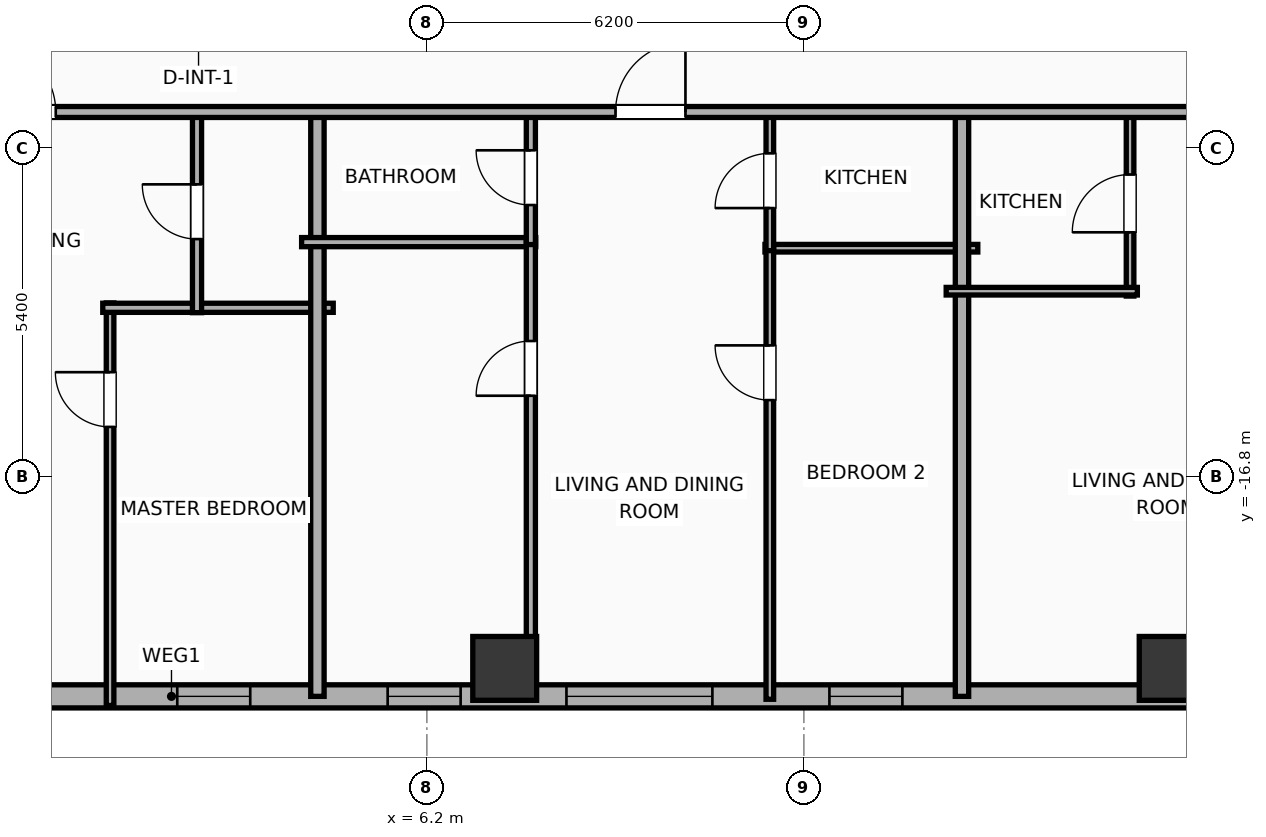
"""IFC4 building model, lengths in metres.
Left out: names, types, materials, properties, quantities, classifications, styles, units other than length and angle.
Written with IfcOpenShell. Run it as: python <this file> out.ifc"""

import sys

from ifc_helpers import new_model, si_unit, direction, frame, frame_2d, origin, origin_2d, place, context, subcontext, project, spatial, rectangle, hollow_rectangle, extrude, element, fill, save


model = new_model("IFC4")
c1 = context("Model", 3, precision=1e-05, world=origin(), true_north=direction((0.0, 1.0)))
c2 = subcontext(c1, "Body", "Model", "MODEL_VIEW")
j1 = project(units=[si_unit("LENGTHUNIT", "METRE"), si_unit("PLANEANGLEUNIT", "RADIAN")], contexts=[c1])
p1 = place(None, origin())
s1 = spatial("IfcSite", under=j1, at=p1, CompositionType="ELEMENT")
p2 = place(p1, origin())
s2 = spatial("IfcBuilding", under=s1, at=p2, CompositionType="ELEMENT")
p3 = place(p2, frame((0.0, 0.0, 109.2)))
s3 = spatial("IfcBuildingStorey", under=s2, at=p3, CompositionType="ELEMENT", Elevation=109.2)
for number, where, z_axis, x_axis in (
    (1, (7.48, -19.95, 0.0), (0.0, 0.0, 1.0), (1.0, 0.0, 0.0)),
    (2, (18.44, -19.95, 0.0), (0.0, 0.0, 1.0), (1.0, 0.0, 0.0)),
):
    element("IfcColumn", number, at=place(p3, frame(where, z_axis=z_axis, x_axis=x_axis)), inside=s3, PredefinedType="COLUMN", context=c2, shape_type="SweptSolid", body=[
        extrude(hollow_rectangle(XDim=1.05, YDim=1.05, WallThickness=0.036, at=origin_2d()), origin(), (0.0, 0.0, 1.0), 3.9),
    ])
p4 = place(p3, frame((29.381, -20.41, 0.0), z_axis=(0.0, 0.0, 1.0), x_axis=(-1.0, 0.0, 0.0)))
e3 = element("IfcWall", 3, at=p4, inside=s3, PredefinedType="ELEMENTEDWALL", context=c2, shape_type="SweptSolid", body=[
    extrude(rectangle(XDim=54.763, YDim=0.38, at=frame_2d((27.381, 0.0))), origin(), (0.0, 0.0, 1.0), 3.65),
])
p5 = place(p4, frame((3.995, 0.0, 0.75)))
e4 = element("IfcOpeningElement", 4, at=p5, cuts=e3, PredefinedType="OPENING", context=c2, shape_type="SweptSolid", body=[
    extrude(rectangle(XDim=2.4, YDim=2.1, at=frame_2d((1.2, 1.05))), frame((0.0, 0.2, 0.0), z_axis=(0.0, -1.0, 0.0), x_axis=(1.0, 0.0, 0.0)), (0.0, 0.0, 1.0), 0.4),
])
p6 = place(p4, frame((18.486, 0.0, 0.75)))
e5 = element("IfcOpeningElement", 5, at=p6, cuts=e3, PredefinedType="OPENING", context=c2, shape_type="SweptSolid", body=[
    extrude(rectangle(XDim=2.4, YDim=2.1, at=frame_2d((1.2, 1.05))), frame((0.0, 0.2, 0.0), z_axis=(0.0, -1.0, 0.0), x_axis=(1.0, 0.0, 0.0)), (0.0, 0.0, 1.0), 0.4),
])
p7 = place(p4, frame((46.717, 0.0, 0.75)))
e6 = element("IfcOpeningElement", 6, at=p7, cuts=e3, PredefinedType="OPENING", context=c2, shape_type="SweptSolid", body=[
    extrude(rectangle(XDim=2.4, YDim=2.1, at=frame_2d((1.2, 1.05))), frame((0.0, 0.2, 0.0), z_axis=(0.0, -1.0, 0.0), x_axis=(1.0, 0.0, 0.0)), (0.0, 0.0, 1.0), 0.4),
])
p8 = place(p4, frame((52.651, 0.0, 0.75)))
e7 = element("IfcOpeningElement", 7, at=p8, cuts=e3, PredefinedType="OPENING", context=c2, shape_type="SweptSolid", body=[
    extrude(rectangle(XDim=1.2, YDim=2.05, at=frame_2d((0.6, 1.025))), frame((0.0, 0.2, 0.0), z_axis=(0.0, -1.0, 0.0), x_axis=(1.0, 0.0, 0.0)), (0.0, 0.0, 1.0), 0.4),
])
p9 = place(p4, frame((50.521, 0.0, 0.75)))
e8 = element("IfcOpeningElement", 8, at=p9, cuts=e3, PredefinedType="OPENING", context=c2, shape_type="SweptSolid", body=[
    extrude(rectangle(XDim=1.2, YDim=2.05, at=frame_2d((0.6, 1.025))), frame((0.0, 0.2, 0.0), z_axis=(0.0, -1.0, 0.0), x_axis=(1.0, 0.0, 0.0)), (0.0, 0.0, 1.0), 0.4),
])
p10 = place(p4, frame((40.191, 0.0, 0.75)))
e9 = element("IfcOpeningElement", 9, at=p10, cuts=e3, PredefinedType="OPENING", context=c2, shape_type="SweptSolid", body=[
    extrude(rectangle(XDim=1.2, YDim=2.05, at=frame_2d((0.6, 1.025))), frame((0.0, 0.2, 0.0), z_axis=(0.0, -1.0, 0.0), x_axis=(1.0, 0.0, 0.0)), (0.0, 0.0, 1.0), 0.4),
])
p11 = place(p4, frame((44.631, 0.0, 0.75)))
e10 = element("IfcOpeningElement", 10, at=p11, cuts=e3, PredefinedType="OPENING", context=c2, shape_type="SweptSolid", body=[
    extrude(rectangle(XDim=1.2, YDim=2.05, at=frame_2d((0.6, 1.025))), frame((0.0, 0.2, 0.0), z_axis=(0.0, -1.0, 0.0), x_axis=(1.0, 0.0, 0.0)), (0.0, 0.0, 1.0), 0.4),
])
p12 = place(p4, frame((36.561, 0.0, 0.75)))
e11 = element("IfcOpeningElement", 11, at=p12, cuts=e3, PredefinedType="OPENING", context=c2, shape_type="SweptSolid", body=[
    extrude(rectangle(XDim=1.2, YDim=2.05, at=frame_2d((0.6, 1.025))), frame((0.0, 0.2, 0.0), z_axis=(0.0, -1.0, 0.0), x_axis=(1.0, 0.0, 0.0)), (0.0, 0.0, 1.0), 0.4),
])
p13 = place(p4, frame((30.004, 0.0, 0.75)))
e12 = element("IfcOpeningElement", 12, at=p13, cuts=e3, PredefinedType="OPENING", context=c2, shape_type="SweptSolid", body=[
    extrude(rectangle(XDim=1.2, YDim=2.05, at=frame_2d((0.6, 1.025))), frame((0.0, 0.2, 0.0), z_axis=(0.0, -1.0, 0.0), x_axis=(1.0, 0.0, 0.0)), (0.0, 0.0, 1.0), 0.4),
])
p14 = place(p4, frame((33.599, 0.0, 0.75)))
e13 = element("IfcOpeningElement", 13, at=p14, cuts=e3, PredefinedType="OPENING", context=c2, shape_type="SweptSolid", body=[
    extrude(rectangle(XDim=1.2, YDim=2.05, at=frame_2d((0.6, 1.025))), frame((0.0, 0.2, 0.0), z_axis=(0.0, -1.0, 0.0), x_axis=(1.0, 0.0, 0.0)), (0.0, 0.0, 1.0), 0.4),
])
p15 = place(p4, frame((26.086, 0.0, 0.75)))
e14 = element("IfcOpeningElement", 14, at=p15, cuts=e3, PredefinedType="OPENING", context=c2, shape_type="SweptSolid", body=[
    extrude(rectangle(XDim=1.2, YDim=2.05, at=frame_2d((0.6, 1.025))), frame((0.0, 0.2, 0.0), z_axis=(0.0, -1.0, 0.0), x_axis=(1.0, 0.0, 0.0)), (0.0, 0.0, 1.0), 0.4),
])
p16 = place(p4, frame((22.626, 0.0, 0.75)))
e15 = element("IfcOpeningElement", 15, at=p16, cuts=e3, PredefinedType="OPENING", context=c2, shape_type="SweptSolid", body=[
    extrude(rectangle(XDim=1.2, YDim=2.05, at=frame_2d((0.6, 1.025))), frame((0.0, 0.2, 0.0), z_axis=(0.0, -1.0, 0.0), x_axis=(1.0, 0.0, 0.0)), (0.0, 0.0, 1.0), 0.4),
])
p17 = place(p4, frame((15.361, 0.0, 0.75)))
e16 = element("IfcOpeningElement", 16, at=p17, cuts=e3, PredefinedType="OPENING", context=c2, shape_type="SweptSolid", body=[
    extrude(rectangle(XDim=1.2, YDim=2.05, at=frame_2d((0.6, 1.025))), frame((0.0, 0.2, 0.0), z_axis=(0.0, -1.0, 0.0), x_axis=(1.0, 0.0, 0.0)), (0.0, 0.0, 1.0), 0.4),
])
p18 = place(p4, frame((8.986, 0.0, 0.75)))
e17 = element("IfcOpeningElement", 17, at=p18, cuts=e3, PredefinedType="OPENING", context=c2, shape_type="SweptSolid", body=[
    extrude(rectangle(XDim=1.2, YDim=2.05, at=frame_2d((0.6, 1.025))), frame((0.0, 0.2, 0.0), z_axis=(0.0, -1.0, 0.0), x_axis=(1.0, 0.0, 0.0)), (0.0, 0.0, 1.0), 0.4),
])
p19 = place(p4, frame((1.736, 0.0, 0.75)))
e18 = element("IfcOpeningElement", 18, at=p19, cuts=e3, PredefinedType="OPENING", context=c2, shape_type="SweptSolid", body=[
    extrude(rectangle(XDim=1.2, YDim=2.05, at=frame_2d((0.6, 1.025))), frame((0.0, 0.2, 0.0), z_axis=(0.0, -1.0, 0.0), x_axis=(1.0, 0.0, 0.0)), (0.0, 0.0, 1.0), 0.4),
])
p20 = place(p3, frame((0.99, -20.56, 0.0), z_axis=(0.0, 0.0, 1.0), x_axis=(0.0, 1.0, 0.0)))
e19 = element("IfcWall", 19, at=p20, inside=s3, PredefinedType="PARTITIONING", context=c2, shape_type="SweptSolid", body=[
    extrude(rectangle(XDim=6.62, YDim=0.125, at=frame_2d((3.31, 0.0))), origin(), (0.0, 0.0, 1.0), 3.65),
])
p21 = place(p20, frame((4.581, 0.0, 0.0)))
e20 = element("IfcOpeningElement", 20, at=p21, cuts=e19, PredefinedType="OPENING", context=c2, shape_type="SweptSolid", body=[
    extrude(rectangle(XDim=0.9, YDim=2.05, at=frame_2d((0.45, 1.025))), frame((0.0, 0.073, 0.0), z_axis=(0.0, -1.0, 0.0), x_axis=(1.0, 0.0, 0.0)), (0.0, 0.0, 1.0), 0.145),
])
p22 = place(p3, frame((0.87, -14.02, 0.0), z_axis=(0.0, 0.0, 1.0), x_axis=(1.0, 0.0, 0.0)))
e21 = element("IfcWall", 21, at=p22, inside=s3, PredefinedType="PLUMBINGWALL", context=c2, shape_type="SweptSolid", body=[
    extrude(rectangle(XDim=3.79, YDim=0.15, at=frame_2d((1.895, 0.0))), origin(), (0.0, 0.0, 1.0), 3.65),
])
p23 = place(p3, frame((2.42, -14.1, 0.0), z_axis=(0.0, 0.0, 1.0), x_axis=(0.0, 1.0, 0.0)))
e22 = element("IfcWall", 22, at=p23, inside=s3, PredefinedType="PLUMBINGWALL", context=c2, shape_type="SweptSolid", body=[
    extrude(rectangle(XDim=3.32, YDim=0.15, at=frame_2d((1.66, 0.0))), origin(), (0.0, 0.0, 1.0), 3.65),
])
p24 = place(p23, frame((1.21, 0.0, 0.0)))
e23 = element("IfcOpeningElement", 23, at=p24, cuts=e22, PredefinedType="OPENING", context=c2, shape_type="SweptSolid", body=[
    extrude(rectangle(XDim=0.9, YDim=2.05, at=frame_2d((0.45, 1.025))), frame((0.0, 0.085, 0.0), z_axis=(0.0, -1.0, 0.0), x_axis=(1.0, 0.0, 0.0)), (0.0, 0.0, 1.0), 0.17),
])
p25 = place(p3, frame((4.4, -20.41, 0.0), z_axis=(0.0, 0.0, 1.0), x_axis=(0.0, 1.0, 0.0)))
e24 = element("IfcWall", 24, at=p25, inside=s3, PredefinedType="PARTITIONING", context=c2, shape_type="SweptSolid", body=[
    extrude(rectangle(XDim=9.69, YDim=0.22, at=frame_2d((4.845, 0.0))), origin(), (0.0, 0.0, 1.0), 3.65),
])
p26 = place(p3, frame((4.14, -12.94, 0.0), z_axis=(0.0, 0.0, 1.0), x_axis=(1.0, 0.0, 0.0)))
e25 = element("IfcWall", 25, at=p26, inside=s3, PredefinedType="PLUMBINGWALL", context=c2, shape_type="SweptSolid", body=[
    extrude(rectangle(XDim=3.85, YDim=0.15, at=frame_2d((1.925, 0.0))), origin(), (0.0, 0.0, 1.0), 3.65),
])
p27 = place(p3, frame((11.76, -13.04, 0.0), z_axis=(0.0, 0.0, 1.0), x_axis=(1.0, 0.0, 0.0)))
e26 = element("IfcWall", 26, at=p27, inside=s3, PredefinedType="PARTITIONING", context=c2, shape_type="SweptSolid", body=[
    extrude(rectangle(XDim=3.5, YDim=0.125, at=frame_2d((1.75, 0.0))), origin(), (0.0, 0.0, 1.0), 3.65),
])
p28 = place(p3, frame((7.91, -20.458, 0.0), z_axis=(0.0, 0.0, 1.0), x_axis=(0.0, 1.0, 0.0)))
e27 = element("IfcWall", 27, at=p28, inside=s3, PredefinedType="PLUMBINGWALL", context=c2, shape_type="SweptSolid", body=[
    extrude(rectangle(XDim=7.558, YDim=0.15, at=frame_2d((3.779, 0.0))), origin(), (0.0, 0.0, 1.0), 3.65),
])
p29 = place(p28, frame((4.991, 0.0, 0.0)))
e28 = element("IfcOpeningElement", 28, at=p29, cuts=e27, PredefinedType="OPENING", context=c2, shape_type="SweptSolid", body=[
    extrude(rectangle(XDim=0.9, YDim=2.05, at=frame_2d((0.45, 1.025))), frame((0.0, 0.085, 0.0), z_axis=(0.0, -1.0, 0.0), x_axis=(1.0, 0.0, 0.0)), (0.0, 0.0, 1.0), 0.17),
])
p30 = place(p3, frame((7.91, -12.98, 0.0), z_axis=(0.0, 0.0, 1.0), x_axis=(0.0, 1.0, 0.0)))
e29 = element("IfcWall", 29, at=p30, inside=s3, PredefinedType="PLUMBINGWALL", context=c2, shape_type="SweptSolid", body=[
    extrude(rectangle(XDim=2.2, YDim=0.15, at=frame_2d((1.1, 0.0))), origin(), (0.0, 0.0, 1.0), 3.65),
])
p31 = place(p30, frame((0.65, 0.0, 0.0)))
e30 = element("IfcOpeningElement", 30, at=p31, cuts=e29, PredefinedType="OPENING", context=c2, shape_type="SweptSolid", body=[
    extrude(rectangle(XDim=0.9, YDim=2.05, at=frame_2d((0.45, 1.025))), frame((0.0, 0.085, 0.0), z_axis=(0.0, -1.0, 0.0), x_axis=(1.0, 0.0, 0.0)), (0.0, 0.0, 1.0), 0.17),
])
p32 = place(p3, frame((11.84, -20.458, 0.0), z_axis=(0.0, 0.0, 1.0), x_axis=(0.0, 1.0, 0.0)))
e31 = element("IfcWall", 31, at=p32, inside=s3, PredefinedType="PARTITIONING", context=c2, shape_type="SweptSolid", body=[
    extrude(rectangle(XDim=7.458, YDim=0.125, at=frame_2d((3.729, 0.0))), origin(), (0.0, 0.0, 1.0), 3.65),
])
p33 = place(p32, frame((4.919, 0.0, 0.0)))
e32 = element("IfcOpeningElement", 32, at=p33, cuts=e31, PredefinedType="OPENING", context=c2, shape_type="SweptSolid", body=[
    extrude(rectangle(XDim=0.9, YDim=2.05, at=frame_2d((0.45, 1.025))), frame((0.0, 0.073, 0.0), z_axis=(0.0, -1.0, 0.0), x_axis=(1.0, 0.0, 0.0)), (0.0, 0.0, 1.0), 0.145),
])
p34 = place(p3, frame((11.84, -13.08, 0.0), z_axis=(0.0, 0.0, 1.0), x_axis=(0.0, 1.0, 0.0)))
e33 = element("IfcWall", 33, at=p34, inside=s3, PredefinedType="PARTITIONING", context=c2, shape_type="SweptSolid", body=[
    extrude(rectangle(XDim=2.3, YDim=0.125, at=frame_2d((1.15, 0.0))), origin(), (0.0, 0.0, 1.0), 3.65),
])
p35 = place(p34, frame((0.7, 0.0, 0.0)))
e34 = element("IfcOpeningElement", 34, at=p35, cuts=e33, PredefinedType="OPENING", context=c2, shape_type="SweptSolid", body=[
    extrude(rectangle(XDim=0.9, YDim=2.05, at=frame_2d((0.45, 1.025))), frame((0.0, 0.073, 0.0), z_axis=(0.0, -1.0, 0.0), x_axis=(1.0, 0.0, 0.0)), (0.0, 0.0, 1.0), 0.145),
])
p36 = place(p3, frame((15.0, -20.41, 0.0), z_axis=(0.0, 0.0, 1.0), x_axis=(0.0, 1.0, 0.0)))
e35 = element("IfcWall", 35, at=p36, inside=s3, PredefinedType="PARTITIONING", context=c2, shape_type="SweptSolid", body=[
    extrude(rectangle(XDim=9.69, YDim=0.22, at=frame_2d((4.845, 0.0))), origin(), (0.0, 0.0, 1.0), 3.65),
])
p37 = place(p3, frame((17.764, -13.827, 0.0), z_axis=(0.0, 0.0, 1.0), x_axis=(0.0, 1.0, 0.0)))
e36 = element("IfcWall", 36, at=p37, inside=s3, PredefinedType="PARTITIONING", context=c2, shape_type="SweptSolid", body=[
    extrude(rectangle(XDim=3.047, YDim=0.125, at=frame_2d((1.523, 0.0))), origin(), (0.0, 0.0, 1.0), 3.65),
])
p38 = place(p37, frame((1.049, 0.0, 0.0)))
e37 = element("IfcOpeningElement", 37, at=p38, cuts=e36, PredefinedType="OPENING", context=c2, shape_type="SweptSolid", body=[
    extrude(rectangle(XDim=0.95, YDim=2.05, at=frame_2d((0.475, 1.025))), frame((0.0, 0.073, 0.0), z_axis=(0.0, -1.0, 0.0), x_axis=(1.0, 0.0, 0.0)), (0.0, 0.0, 1.0), 0.145),
])
p39 = place(p3, frame((14.74, -13.747, 0.0), z_axis=(0.0, 0.0, 1.0), x_axis=(1.0, 0.0, 0.0)))
e38 = element("IfcWall", 38, at=p39, inside=s3, PredefinedType="PARTITIONING", context=c2, shape_type="SweptSolid", body=[
    extrude(rectangle(XDim=3.144, YDim=0.125, at=frame_2d((1.572, 0.0))), origin(), (0.0, 0.0, 1.0), 3.65),
])
p40 = place(p3, frame((-29.21, -10.8, 0.0), z_axis=(0.0, 0.0, 1.0), x_axis=(1.0, 0.0, 0.0)))
e39 = element("IfcWall", 39, at=p40, inside=s3, PredefinedType="PARTITIONING", context=c2, shape_type="SweptSolid", body=[
    extrude(rectangle(XDim=62.42, YDim=0.18, at=frame_2d((31.21, 0.0))), origin(), (0.0, 0.0, 1.0), 3.65),
])
p41 = place(p40, frame((2.74, 0.0, 0.0)))
e40 = element("IfcOpeningElement", 40, at=p41, cuts=e39, PredefinedType="OPENING", context=c2, shape_type="SweptSolid", body=[
    extrude(rectangle(XDim=0.9, YDim=2.05, at=frame_2d((0.45, 1.025))), frame((0.0, 0.1, 0.0), z_axis=(0.0, -1.0, 0.0), x_axis=(1.0, 0.0, 0.0)), (0.0, 0.0, 1.0), 0.2),
])
p42 = place(p40, frame((9.968, 0.0, 0.0)))
e41 = element("IfcOpeningElement", 41, at=p42, cuts=e39, PredefinedType="OPENING", context=c2, shape_type="SweptSolid", body=[
    extrude(rectangle(XDim=1.15, YDim=2.05, at=frame_2d((0.575, 1.025))), frame((0.0, 0.1, 0.0), z_axis=(0.0, -1.0, 0.0), x_axis=(1.0, 0.0, 0.0)), (0.0, 0.0, 1.0), 0.2),
])
p43 = place(p40, frame((17.227, 0.0, 0.0)))
e42 = element("IfcOpeningElement", 42, at=p43, cuts=e39, PredefinedType="OPENING", context=c2, shape_type="SweptSolid", body=[
    extrude(rectangle(XDim=1.15, YDim=2.05, at=frame_2d((0.575, 1.025))), frame((0.0, 0.1, 0.0), z_axis=(0.0, -1.0, 0.0), x_axis=(1.0, 0.0, 0.0)), (0.0, 0.0, 1.0), 0.2),
])
p44 = place(p40, frame((28.157, 0.0, 0.0)))
e43 = element("IfcOpeningElement", 43, at=p44, cuts=e39, PredefinedType="OPENING", context=c2, shape_type="SweptSolid", body=[
    extrude(rectangle(XDim=1.15, YDim=2.05, at=frame_2d((0.575, 1.025))), frame((0.0, 0.1, 0.0), z_axis=(0.0, -1.0, 0.0), x_axis=(1.0, 0.0, 0.0)), (0.0, 0.0, 1.0), 0.2),
])
p45 = place(p40, frame((38.512, 0.0, 0.0)))
e44 = element("IfcOpeningElement", 44, at=p45, cuts=e39, PredefinedType="OPENING", context=c2, shape_type="SweptSolid", body=[
    extrude(rectangle(XDim=1.15, YDim=2.05, at=frame_2d((0.575, 1.025))), frame((0.0, 0.1, 0.0), z_axis=(0.0, -1.0, 0.0), x_axis=(1.0, 0.0, 0.0)), (0.0, 0.0, 1.0), 0.2),
])
p46 = place(p40, frame((49.33, 0.0, 0.0)))
e45 = element("IfcOpeningElement", 45, at=p46, cuts=e39, PredefinedType="OPENING", context=c2, shape_type="SweptSolid", body=[
    extrude(rectangle(XDim=1.15, YDim=2.05, at=frame_2d((0.575, 1.025))), frame((0.0, 0.1, 0.0), z_axis=(0.0, -1.0, 0.0), x_axis=(1.0, 0.0, 0.0)), (0.0, 0.0, 1.0), 0.2),
])
p47 = place(p40, frame((58.237, 0.0, 0.0)))
e46 = element("IfcOpeningElement", 46, at=p47, cuts=e39, PredefinedType="OPENING", context=c2, shape_type="SweptSolid", body=[
    extrude(rectangle(XDim=1.15, YDim=2.05, at=frame_2d((0.575, 1.025))), frame((0.0, 0.1, 0.0), z_axis=(0.0, -1.0, 0.0), x_axis=(1.0, 0.0, 0.0)), (0.0, 0.0, 1.0), 0.2),
])
p48 = place(p6, origin())
e47 = element("IfcWindow", 47, at=p48, inside=s3, PartitioningType="SINGLE_PANEL", PredefinedType="WINDOW", context=c2, shape_type="SweptSolid", body=[
    extrude(rectangle(XDim=2.4, YDim=2.1, at=frame_2d((1.2, 1.05))), frame((0.0, 0.03, 0.0), z_axis=(0.0, -1.0, 0.0), x_axis=(1.0, 0.0, 0.0)), (0.0, 0.0, 1.0), 0.06),
])
fill(e5, e47)
p49 = place(p15, origin())
e48 = element("IfcWindow", 48, at=p49, inside=s3, PartitioningType="SINGLE_PANEL", PredefinedType="WINDOW", context=c2, shape_type="SweptSolid", body=[
    extrude(rectangle(XDim=1.2, YDim=2.05, at=frame_2d((0.6, 1.025))), frame((0.0, 0.03, 0.0), z_axis=(0.0, -1.0, 0.0), x_axis=(1.0, 0.0, 0.0)), (0.0, 0.0, 1.0), 0.06),
])
fill(e14, e48)
p50 = place(p16, origin())
e49 = element("IfcWindow", 49, at=p50, inside=s3, PartitioningType="SINGLE_PANEL", PredefinedType="WINDOW", context=c2, shape_type="SweptSolid", body=[
    extrude(rectangle(XDim=1.2, YDim=2.05, at=frame_2d((0.6, 1.025))), frame((0.0, 0.03, 0.0), z_axis=(0.0, -1.0, 0.0), x_axis=(1.0, 0.0, 0.0)), (0.0, 0.0, 1.0), 0.06),
])
fill(e15, e49)
p51 = place(p17, origin())
e50 = element("IfcWindow", 50, at=p51, inside=s3, PartitioningType="SINGLE_PANEL", PredefinedType="WINDOW", context=c2, shape_type="SweptSolid", body=[
    extrude(rectangle(XDim=1.2, YDim=2.05, at=frame_2d((0.6, 1.025))), frame((0.0, 0.03, 0.0), z_axis=(0.0, -1.0, 0.0), x_axis=(1.0, 0.0, 0.0)), (0.0, 0.0, 1.0), 0.06),
])
fill(e16, e50)
p52 = place(p21, origin())
e51 = element("IfcDoor", 51, at=p52, inside=s3, OperationType="SINGLE_SWING_RIGHT", PredefinedType="DOOR", context=c2, shape_type="SweptSolid", body=[
    extrude(rectangle(XDim=0.9, YDim=2.05, at=frame_2d((0.45, 1.025))), frame((0.0, 0.025, 0.0), z_axis=(0.0, -1.0, 0.0), x_axis=(1.0, 0.0, 0.0)), (0.0, 0.0, 1.0), 0.05),
])
fill(e20, e51)
p53 = place(p24, origin())
e52 = element("IfcDoor", 52, at=p53, inside=s3, OperationType="SINGLE_SWING_RIGHT", PredefinedType="DOOR", context=c2, shape_type="SweptSolid", body=[
    extrude(rectangle(XDim=0.9, YDim=2.05, at=frame_2d((0.45, 1.025))), frame((0.0, 0.025, 0.0), z_axis=(0.0, -1.0, 0.0), x_axis=(1.0, 0.0, 0.0)), (0.0, 0.0, 1.0), 0.05),
])
fill(e23, e52)
p54 = place(p29, origin())
e53 = element("IfcDoor", 53, at=p54, inside=s3, OperationType="SINGLE_SWING_LEFT", PredefinedType="DOOR", context=c2, shape_type="SweptSolid", body=[
    extrude(rectangle(XDim=0.9, YDim=2.05, at=frame_2d((0.45, 1.025))), frame((0.0, 0.025, 0.0), z_axis=(0.0, -1.0, 0.0), x_axis=(1.0, 0.0, 0.0)), (0.0, 0.0, 1.0), 0.05),
])
fill(e28, e53)
p55 = place(p31, origin())
e54 = element("IfcDoor", 54, at=p55, inside=s3, OperationType="SINGLE_SWING_RIGHT", PredefinedType="DOOR", context=c2, shape_type="SweptSolid", body=[
    extrude(rectangle(XDim=0.9, YDim=2.05, at=frame_2d((0.45, 1.025))), frame((0.0, 0.025, 0.0), z_axis=(0.0, -1.0, 0.0), x_axis=(1.0, 0.0, 0.0)), (0.0, 0.0, 1.0), 0.05),
])
fill(e30, e54)
p56 = place(p33, origin())
e55 = element("IfcDoor", 55, at=p56, inside=s3, OperationType="SINGLE_SWING_RIGHT", PredefinedType="DOOR", context=c2, shape_type="SweptSolid", body=[
    extrude(rectangle(XDim=0.9, YDim=2.05, at=frame_2d((0.45, 1.025))), frame((0.0, 0.025, 0.0), z_axis=(0.0, -1.0, 0.0), x_axis=(1.0, 0.0, 0.0)), (0.0, 0.0, 1.0), 0.05),
])
fill(e32, e55)
p57 = place(p35, origin())
e56 = element("IfcDoor", 56, at=p57, inside=s3, OperationType="SINGLE_SWING_LEFT", PredefinedType="DOOR", context=c2, shape_type="SweptSolid", body=[
    extrude(rectangle(XDim=0.9, YDim=2.05, at=frame_2d((0.45, 1.025))), frame((0.0, 0.025, 0.0), z_axis=(0.0, -1.0, 0.0), x_axis=(1.0, 0.0, 0.0)), (0.0, 0.0, 1.0), 0.05),
])
fill(e34, e56)
p58 = place(p38, origin())
e57 = element("IfcDoor", 57, at=p58, inside=s3, OperationType="SINGLE_SWING_LEFT", PredefinedType="DOOR", context=c2, shape_type="SweptSolid", body=[
    extrude(rectangle(XDim=0.95, YDim=2.05, at=frame_2d((0.475, 1.025))), frame((0.0, 0.025, 0.0), z_axis=(0.0, -1.0, 0.0), x_axis=(1.0, 0.0, 0.0)), (0.0, 0.0, 1.0), 0.05),
])
fill(e37, e57)
p59 = place(p44, origin())
e58 = element("IfcDoor", 58, at=p59, inside=s3, OperationType="SINGLE_SWING_LEFT", PredefinedType="DOOR", context=c2, shape_type="SweptSolid", body=[
    extrude(rectangle(XDim=1.15, YDim=2.05, at=frame_2d((0.575, 1.025))), frame((0.0, 0.025, 0.0), z_axis=(0.0, -1.0, 0.0), x_axis=(1.0, 0.0, 0.0)), (0.0, 0.0, 1.0), 0.05),
])
fill(e43, e58)
p60 = place(p45, origin())
e59 = element("IfcDoor", 59, at=p60, inside=s3, OperationType="SINGLE_SWING_RIGHT", PredefinedType="DOOR", context=c2, shape_type="SweptSolid", body=[
    extrude(rectangle(XDim=1.15, YDim=2.05, at=frame_2d((0.575, 1.025))), frame((0.0, 0.025, 0.0), z_axis=(0.0, -1.0, 0.0), x_axis=(1.0, 0.0, 0.0)), (0.0, 0.0, 1.0), 0.05),
])
fill(e44, e59)
save(model, sys.argv[1])
